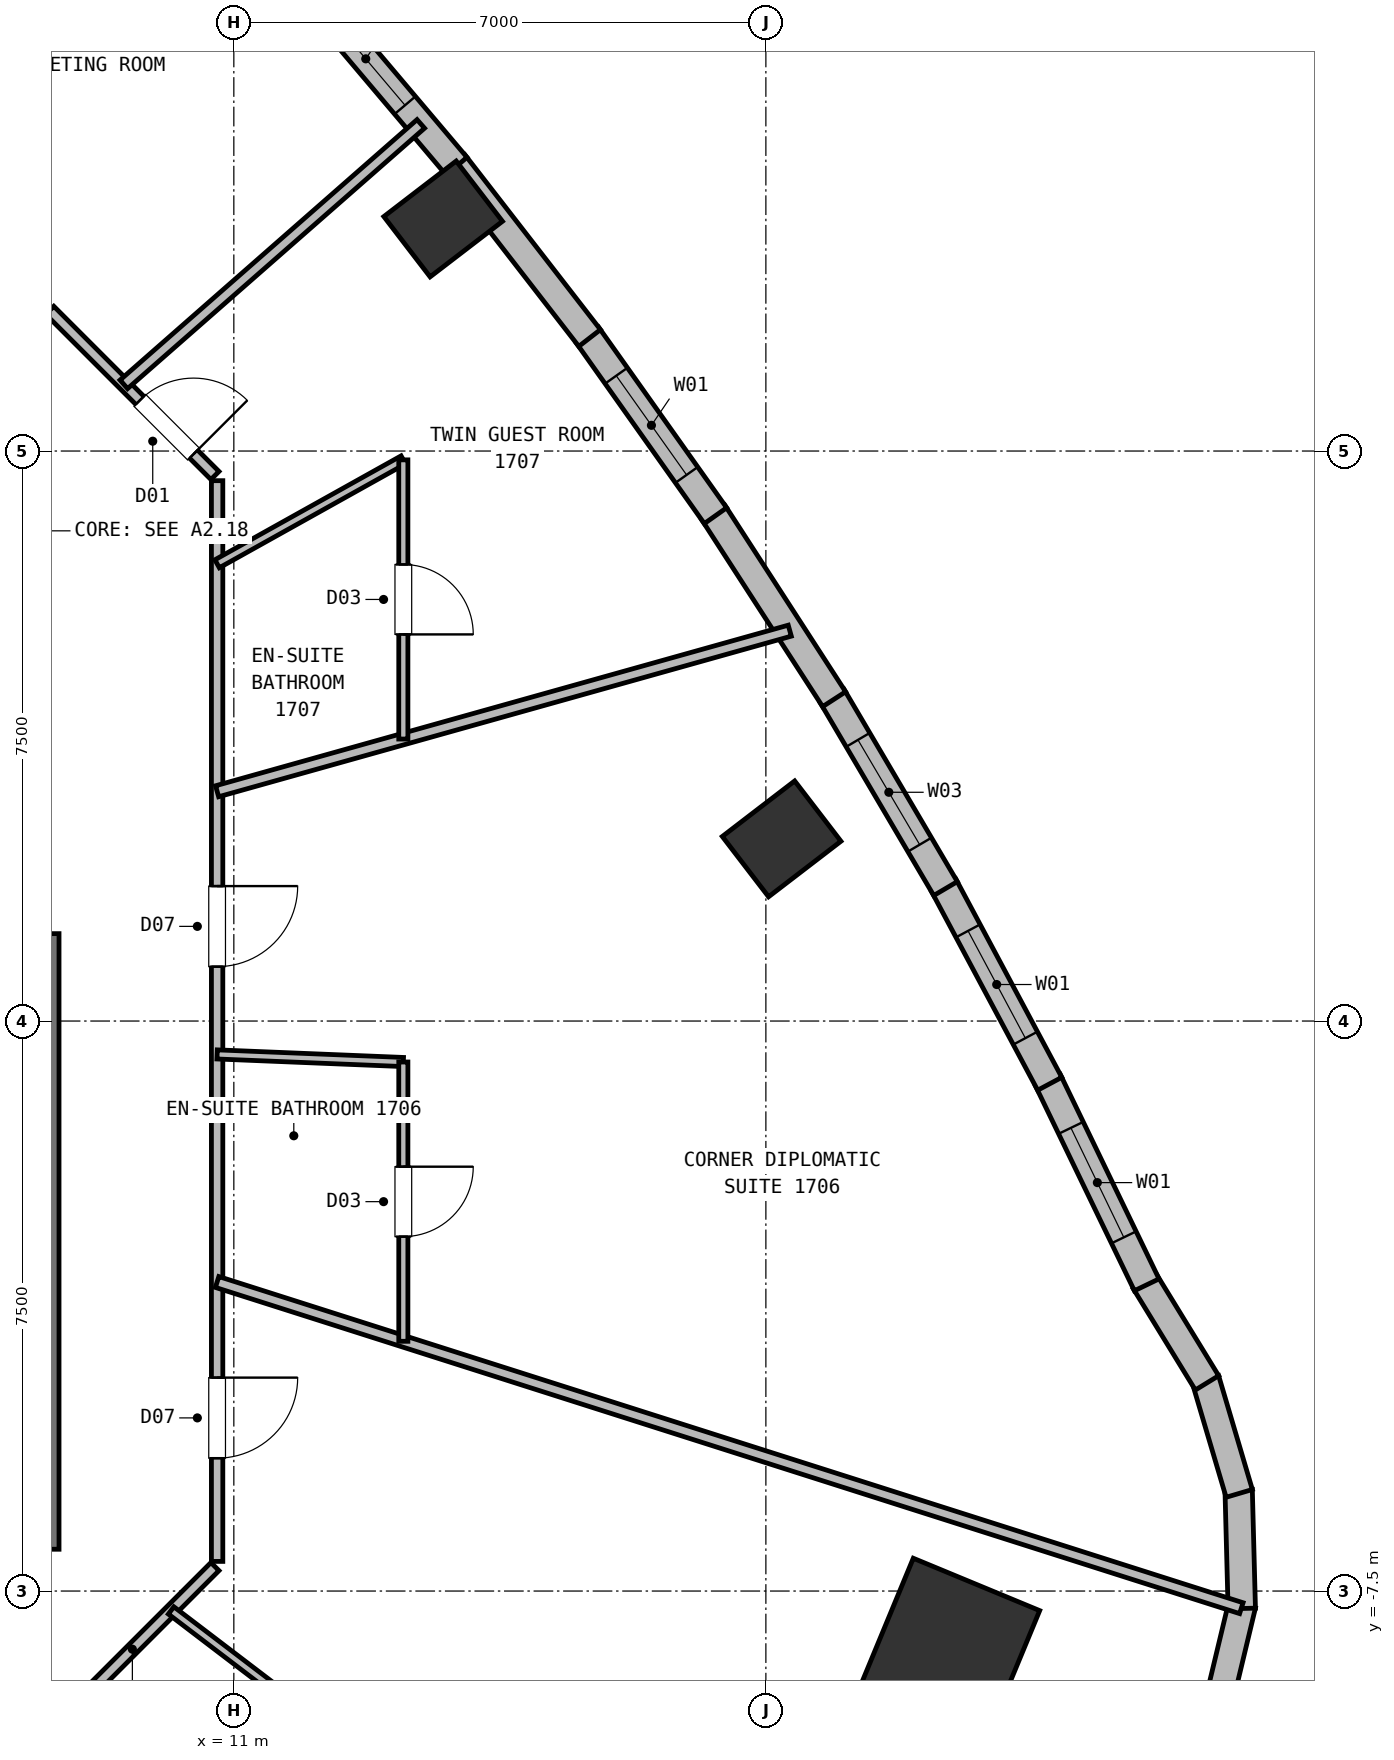
"""IFC4 building model, lengths in metres.
Left out: names, types, materials, properties, quantities, classifications, styles, units other than length and angle.
Written with IfcOpenShell. Run it as: python <this file> out.ifc"""

import sys

from ifc_helpers import new_model, si_unit, direction, frame, frame_2d, origin, origin_2d, place, context, subcontext, project, spatial, rectangle, extrude, element, fill, save


model = new_model("IFC4")
c1 = context("Model", 3, precision=1e-05, world=origin(), true_north=direction((0.0, 1.0)))
c2 = subcontext(c1, "Body", "Model", "MODEL_VIEW")
j1 = project(units=[si_unit("LENGTHUNIT", "METRE"), si_unit("PLANEANGLEUNIT", "RADIAN")], contexts=[c1])
p1 = place(None, origin())
s1 = spatial("IfcSite", under=j1, at=p1, CompositionType="ELEMENT")
p2 = place(p1, origin())
s2 = spatial("IfcBuilding", under=s1, at=p2, CompositionType="ELEMENT")
p3 = place(p2, frame((0.0, 0.0, 60.5)))
s3 = spatial("IfcBuildingStorey", under=s2, at=p3, CompositionType="ELEMENT", Elevation=60.5)
p4 = place(p3, frame((8.35, -6.95, 0.0), z_axis=(0.0, 0.0, 1.0), x_axis=(0.0, 1.0, 0.0)))
e1 = element("IfcWall", 1, at=p4, inside=s3, PredefinedType="SHEAR", context=c2, shape_type="SweptSolid", body=[
    extrude(rectangle(XDim=8.1, YDim=0.7, at=frame_2d((4.05, 0.0))), origin(), (0.0, 0.0, 1.0), 3.5),
])
p5 = place(p3, frame((20.35, -8.429, 0.0), z_axis=(0.0, 0.0, 1.0), x_axis=(-0.923879532511, 0.382683432365, 0.0)))
e2 = element("IfcColumn", 2, at=p5, inside=s3, PredefinedType="COLUMN", context=c2, shape_type="SweptSolid", body=[
    extrude(rectangle(XDim=1.8, YDim=2.2, at=origin_2d()), origin(), (0.0, 0.0, 1.0), 3.75),
])
for number, where, z_axis, x_axis in (
    (3, (18.207, 2.397, 0.0), (0.0, 0.0, 1.0), (-0.609, 0.793, 0.0)),
    (4, (13.754, 10.554, 0.0), (0.0, 0.0, 1.0), (-0.609, 0.793, 0.0)),
):
    element("IfcColumn", number, at=place(p3, frame(where, z_axis=z_axis, x_axis=x_axis)), inside=s3, PredefinedType="COLUMN", context=c2, shape_type="SweptSolid", body=[
        extrude(rectangle(XDim=1.0, YDim=1.2, at=origin_2d()), origin(), (0.0, 0.0, 1.0), 3.75),
    ])
p6 = place(p3, frame((24.266, -7.68, 0.0), z_axis=(0.0, 0.0, 1.0), x_axis=(-0.233491011935, -0.97235896013, 0.0)))
e5 = element("IfcWall", 5, at=p6, inside=s3, PredefinedType="SOLIDWALL", context=c2, shape_type="SweptSolid", body=[
    extrude(rectangle(XDim=1.564, YDim=0.36, at=frame_2d((0.782, 0.0))), origin(), (0.0, 0.0, 1.0), 3.5),
])
p7 = place(p3, frame((24.22, -6.166, 0.0), z_axis=(0.0, 0.0, 1.0), x_axis=(0.026224581645, -0.999656076517, 0.0)))
e6 = element("IfcWall", 6, at=p7, inside=s3, PredefinedType="SOLIDWALL", context=c2, shape_type="SweptSolid", body=[
    extrude(rectangle(XDim=1.564, YDim=0.36, at=frame_2d((0.782, 0.0))), origin(), (0.0, 0.0, 1.0), 3.5),
])
for number, where, z_axis, x_axis in (
    (7, (23.784, -4.715, 0.0), (0.0, 0.0, 1.0), (0.284, -0.959, 0.0)),
    (8, (22.987, -3.427, 0.0), (0.0, 0.0, 1.0), (0.523, -0.853, 0.0)),
):
    element("IfcWall", number, at=place(p3, frame(where, z_axis=z_axis, x_axis=x_axis)), inside=s3, PredefinedType="SOLIDWALL", context=c2, shape_type="SweptSolid", body=[
        extrude(rectangle(XDim=1.564, YDim=0.36, at=frame_2d((0.782, 0.0))), origin(), (0.0, 0.0, 1.0), 3.5),
    ])
p8 = place(p3, frame((21.712, -0.781, 0.0), z_axis=(0.0, 0.0, 1.0), x_axis=(0.434746780096, -0.900552739819, 0.0)))
e9 = element("IfcWall", 9, at=p8, inside=s3, PredefinedType="SOLIDWALL", context=c2, shape_type="SweptSolid", body=[
    extrude(rectangle(XDim=2.987, YDim=0.36, at=frame_2d((1.494, 0.0))), origin(), (0.0, 0.0, 1.0), 3.5),
])
p9 = place(p8, frame((0.694, 0.0, 0.72)))
e10 = element("IfcOpeningElement", 10, at=p9, cuts=e9, PredefinedType="OPENING", context=c2, shape_type="SweptSolid", body=[
    extrude(rectangle(XDim=1.6, YDim=1.88, at=frame_2d((0.8, 0.94))), frame((0.0, 0.19, 0.0), z_axis=(0.0, -1.0, 0.0), x_axis=(1.0, 0.0, 0.0)), (0.0, 0.0, 1.0), 0.38),
])
p10 = place(p3, frame((20.339, 1.787, 0.0), z_axis=(0.0, 0.0, 1.0), x_axis=(0.471187121095, -0.882033274267, 0.0)))
e11 = element("IfcWall", 11, at=p10, inside=s3, PredefinedType="SOLIDWALL", context=c2, shape_type="SweptSolid", body=[
    extrude(rectangle(XDim=2.962, YDim=0.36, at=frame_2d((1.481, 0.0))), origin(), (0.0, 0.0, 1.0), 3.5),
])
p11 = place(p10, frame((0.681, 0.0, 0.72)))
e12 = element("IfcOpeningElement", 12, at=p11, cuts=e11, PredefinedType="OPENING", context=c2, shape_type="SweptSolid", body=[
    extrude(rectangle(XDim=1.6, YDim=1.88, at=frame_2d((0.8, 0.94))), frame((0.0, 0.19, 0.0), z_axis=(0.0, -1.0, 0.0), x_axis=(1.0, 0.0, 0.0)), (0.0, 0.0, 1.0), 0.38),
])
p12 = place(p3, frame((18.872, 4.277, 0.0), z_axis=(0.0, 0.0, 1.0), x_axis=(0.507397387312, -0.861712185912, 0.0)))
e13 = element("IfcWall", 13, at=p12, inside=s3, PredefinedType="SOLIDWALL", context=c2, shape_type="SweptSolid", body=[
    extrude(rectangle(XDim=2.941, YDim=0.36, at=frame_2d((1.47, 0.0))), origin(), (0.0, 0.0, 1.0), 3.5),
])
p13 = place(p12, frame((0.67, 0.0, 0.72)))
e14 = element("IfcOpeningElement", 14, at=p13, cuts=e13, PredefinedType="OPENING", context=c2, shape_type="SweptSolid", body=[
    extrude(rectangle(XDim=1.6, YDim=1.88, at=frame_2d((0.8, 0.94))), frame((0.0, 0.19, 0.0), z_axis=(0.0, -1.0, 0.0), x_axis=(1.0, 0.0, 0.0)), (0.0, 0.0, 1.0), 0.38),
])
p14 = place(p3, frame((17.309, 6.691, 0.0), z_axis=(0.0, 0.0, 1.0), x_axis=(0.543168221009, -0.839623894185, 0.0)))
e15 = element("IfcWall", 15, at=p14, inside=s3, PredefinedType="SOLIDWALL", context=c2, shape_type="SweptSolid", body=[
    extrude(rectangle(XDim=2.925, YDim=0.36, at=frame_2d((1.463, 0.0))), origin(), (0.0, 0.0, 1.0), 3.5),
])
p15 = place(p3, frame((15.651, 9.027, 0.0), z_axis=(0.0, 0.0, 1.0), x_axis=(0.578342640262, -0.815793963237, 0.0)))
e16 = element("IfcWall", 16, at=p15, inside=s3, PredefinedType="SOLIDWALL", context=c2, shape_type="SweptSolid", body=[
    extrude(rectangle(XDim=2.915, YDim=0.36, at=frame_2d((1.458, 0.0))), origin(), (0.0, 0.0, 1.0), 3.5),
])
p16 = place(p15, frame((0.657, 0.0, 0.72)))
e17 = element("IfcOpeningElement", 17, at=p16, cuts=e16, PredefinedType="OPENING", context=c2, shape_type="SweptSolid", body=[
    extrude(rectangle(XDim=1.6, YDim=1.88, at=frame_2d((0.8, 0.94))), frame((0.0, 0.19, 0.0), z_axis=(0.0, -1.0, 0.0), x_axis=(1.0, 0.0, 0.0)), (0.0, 0.0, 1.0), 0.38),
])
p17 = place(p3, frame((13.899, 11.287, 0.0), z_axis=(0.0, 0.0, 1.0), x_axis=(0.612545453358, -0.79043536584, 0.0)))
e18 = element("IfcWall", 18, at=p17, inside=s3, PredefinedType="SOLIDWALL", context=c2, shape_type="SweptSolid", body=[
    extrude(rectangle(XDim=2.909, YDim=0.36, at=frame_2d((1.455, 0.0))), origin(), (0.0, 0.0, 1.0), 3.5),
])
p18 = place(p3, frame((12.051, 13.47, 0.0), z_axis=(0.0, 0.0, 1.0), x_axis=(0.645836916795, -0.763475393779, 0.0)))
e19 = element("IfcWall", 19, at=p18, inside=s3, PredefinedType="SOLIDWALL", context=c2, shape_type="SweptSolid", body=[
    extrude(rectangle(XDim=2.91, YDim=0.36, at=frame_2d((1.455, 0.0))), origin(), (0.0, 0.0, 1.0), 3.5),
])
p19 = place(p18, frame((0.26, 0.0, 0.72)))
e20 = element("IfcOpeningElement", 20, at=p19, cuts=e19, PredefinedType="OPENING", context=c2, shape_type="SweptSolid", body=[
    extrude(rectangle(XDim=1.6, YDim=1.88, at=frame_2d((0.8, 0.94))), frame((0.0, 0.19, 0.0), z_axis=(0.0, -1.0, 0.0), x_axis=(1.0, 0.0, 0.0)), (0.0, 0.0, 1.0), 0.38),
])
p20 = place(p3, frame((10.752, -7.178, 0.0), z_axis=(0.0, 0.0, 1.0), x_axis=(-0.707067066127, -0.707146494016, 0.0)))
e21 = element("IfcWall", 21, at=p20, inside=s3, PredefinedType="PARTITIONING", context=c2, shape_type="SweptSolid", body=[
    extrude(rectangle(XDim=3.074, YDim=0.15, at=frame_2d((1.537, 0.0))), origin(), (0.0, 0.0, 1.0), 3.12),
])
p21 = place(p3, frame((10.78, 7.11, 0.0), z_axis=(0.0, 0.0, 1.0), x_axis=(0.0, -1.0, 0.0)))
e22 = element("IfcWall", 22, at=p21, inside=s3, PredefinedType="PARTITIONING", context=c2, shape_type="SweptSolid", body=[
    extrude(rectangle(XDim=14.22, YDim=0.15, at=frame_2d((7.11, 0.0))), origin(), (0.0, 0.0, 1.0), 3.12),
])
p22 = place(p21, frame((5.334, 0.0, 0.0)))
e23 = element("IfcOpeningElement", 23, at=p22, cuts=e22, PredefinedType="OPENING", context=c2, shape_type="SweptSolid", body=[
    extrude(rectangle(XDim=1.06, YDim=2.15, at=frame_2d((0.53, 1.075))), frame((0.0, 0.085, 0.0), z_axis=(0.0, -1.0, 0.0), x_axis=(1.0, 0.0, 0.0)), (0.0, 0.0, 1.0), 0.17),
])
p23 = place(p21, frame((11.802, 0.0, 0.0)))
e24 = element("IfcOpeningElement", 24, at=p23, cuts=e22, PredefinedType="OPENING", context=c2, shape_type="SweptSolid", body=[
    extrude(rectangle(XDim=1.06, YDim=2.15, at=frame_2d((0.53, 1.075))), frame((0.0, 0.085, 0.0), z_axis=(0.0, -1.0, 0.0), x_axis=(1.0, 0.0, 0.0)), (0.0, 0.0, 1.0), 0.17),
])
p24 = place(p3, frame((8.578, 9.352, 0.0), z_axis=(0.0, 0.0, 1.0), x_axis=(0.707067066127, -0.707146494016, 0.0)))
e25 = element("IfcWall", 25, at=p24, inside=s3, PredefinedType="PARTITIONING", context=c2, shape_type="SweptSolid", body=[
    extrude(rectangle(XDim=3.074, YDim=0.15, at=frame_2d((1.537, 0.0))), origin(), (0.0, 0.0, 1.0), 3.5),
])
p25 = place(p24, frame((1.676, 0.0, 0.0)))
e26 = element("IfcOpeningElement", 26, at=p25, cuts=e25, PredefinedType="OPENING", context=c2, shape_type="SweptSolid", body=[
    extrude(rectangle(XDim=1.0, YDim=2.15, at=frame_2d((0.5, 1.075))), frame((0.0, 0.085, 0.0), z_axis=(0.0, -1.0, 0.0), x_axis=(1.0, 0.0, 0.0)), (0.0, 0.0, 1.0), 0.17),
])
p26 = place(p3, frame((10.175, -7.755, 0.0), z_axis=(0.0, 0.0, 1.0), x_axis=(0.795354638284, -0.606144371714, 0.0)))
e27 = element("IfcWall", 27, at=p26, inside=s3, PredefinedType="PARTITIONING", context=c2, shape_type="SweptSolid", body=[
    extrude(rectangle(XDim=2.472, YDim=0.12, at=frame_2d((1.236, 0.0))), origin(), (0.0, 0.0, 1.0), 3.5),
])
p27 = place(p3, frame((10.78, -3.433, 0.0), z_axis=(0.0, 0.0, 1.0), x_axis=(0.952837774097, -0.303480108497, 0.0)))
e28 = element("IfcWall", 28, at=p27, inside=s3, PredefinedType="PARTITIONING", context=c2, shape_type="SweptSolid", body=[
    extrude(rectangle(XDim=14.143, YDim=0.15, at=frame_2d((7.071, 0.0))), origin(), (0.0, 0.0, 1.0), 3.5),
])
p28 = place(p3, frame((13.23, -0.539, 0.0), z_axis=(0.0, 0.0, 1.0), x_axis=(-0.999170452606, 0.040723539125, 0.0)))
e29 = element("IfcWall", 29, at=p28, inside=s3, PredefinedType="PARTITIONING", context=c2, shape_type="SweptSolid", body=[
    extrude(rectangle(XDim=2.452, YDim=0.12, at=frame_2d((1.226, 0.0))), origin(), (0.0, 0.0, 1.0), 3.5),
])
p29 = place(p3, frame((13.23, -0.539, 0.0), z_axis=(0.0, 0.0, 1.0), x_axis=(0.0, -1.0, 0.0)))
e30 = element("IfcWall", 30, at=p29, inside=s3, PredefinedType="PARTITIONING", context=c2, shape_type="SweptSolid", body=[
    extrude(rectangle(XDim=3.675, YDim=0.12, at=frame_2d((1.837, 0.0))), origin(), (0.0, 0.0, 1.0), 3.12),
])
p30 = place(p29, frame((1.377, 0.0, 0.0)))
e31 = element("IfcOpeningElement", 31, at=p30, cuts=e30, PredefinedType="OPENING", context=c2, shape_type="SweptSolid", body=[
    extrude(rectangle(XDim=0.92, YDim=2.1, at=frame_2d((0.46, 1.05))), frame((0.0, 0.07, 0.0), z_axis=(0.0, -1.0, 0.0), x_axis=(1.0, 0.0, 0.0)), (0.0, 0.0, 1.0), 0.14),
])
p31 = place(p3, frame((10.78, 3.023, 0.0), z_axis=(0.0, 0.0, 1.0), x_axis=(0.962851172518, 0.27003262688, 0.0)))
e32 = element("IfcWall", 32, at=p31, inside=s3, PredefinedType="PARTITIONING", context=c2, shape_type="SweptSolid", body=[
    extrude(rectangle(XDim=7.825, YDim=0.15, at=frame_2d((3.913, 0.0))), origin(), (0.0, 0.0, 1.0), 3.5),
])
p32 = place(p3, frame((13.23, 7.384, 0.0), z_axis=(0.0, 0.0, 1.0), x_axis=(-0.873232148454, -0.487304437602, 0.0)))
e33 = element("IfcWall", 33, at=p32, inside=s3, PredefinedType="PARTITIONING", context=c2, shape_type="SweptSolid", body=[
    extrude(rectangle(XDim=2.806, YDim=0.12, at=frame_2d((1.403, 0.0))), origin(), (0.0, 0.0, 1.0), 3.5),
])
p33 = place(p3, frame((13.23, 7.384, 0.0), z_axis=(0.0, 0.0, 1.0), x_axis=(0.0, -1.0, 0.0)))
e34 = element("IfcWall", 34, at=p33, inside=s3, PredefinedType="PARTITIONING", context=c2, shape_type="SweptSolid", body=[
    extrude(rectangle(XDim=3.673, YDim=0.12, at=frame_2d((1.837, 0.0))), origin(), (0.0, 0.0, 1.0), 3.5),
])
p34 = place(p33, frame((1.377, 0.0, 0.0)))
e35 = element("IfcOpeningElement", 35, at=p34, cuts=e34, PredefinedType="OPENING", context=c2, shape_type="SweptSolid", body=[
    extrude(rectangle(XDim=0.92, YDim=2.1, at=frame_2d((0.46, 1.05))), frame((0.0, 0.07, 0.0), z_axis=(0.0, -1.0, 0.0), x_axis=(1.0, 0.0, 0.0)), (0.0, 0.0, 1.0), 0.14),
])
p35 = place(p3, frame((9.552, 8.377, 0.0), z_axis=(0.0, 0.0, 1.0), x_axis=(0.75184000053, 0.659345594967, 0.0)))
e36 = element("IfcWall", 36, at=p35, inside=s3, PredefinedType="PARTITIONING", context=c2, shape_type="SweptSolid", body=[
    extrude(rectangle(XDim=5.197, YDim=0.15, at=frame_2d((2.599, 0.0))), origin(), (0.0, 0.0, 1.0), 3.5),
])
p36 = place(p9, origin())
e37 = element("IfcWindow", 37, at=p36, inside=s3, PartitioningType="SINGLE_PANEL", PredefinedType="WINDOW", context=c2, shape_type="SweptSolid", body=[
    extrude(rectangle(XDim=1.6, YDim=1.88, at=frame_2d((0.8, 0.94))), frame((0.0, 0.03, 0.0), z_axis=(0.0, -1.0, 0.0), x_axis=(1.0, 0.0, 0.0)), (0.0, 0.0, 1.0), 0.06),
])
fill(e10, e37)
p37 = place(p11, origin())
e38 = element("IfcWindow", 38, at=p37, inside=s3, PartitioningType="SINGLE_PANEL", PredefinedType="WINDOW", context=c2, shape_type="SweptSolid", body=[
    extrude(rectangle(XDim=1.6, YDim=1.88, at=frame_2d((0.8, 0.94))), frame((0.0, 0.03, 0.0), z_axis=(0.0, -1.0, 0.0), x_axis=(1.0, 0.0, 0.0)), (0.0, 0.0, 1.0), 0.06),
])
fill(e12, e38)
p38 = place(p13, origin())
e39 = element("IfcWindow", 39, at=p38, inside=s3, PartitioningType="SINGLE_PANEL", PredefinedType="WINDOW", context=c2, shape_type="SweptSolid", body=[
    extrude(rectangle(XDim=1.6, YDim=1.88, at=frame_2d((0.8, 0.94))), frame((0.0, 0.03, 0.0), z_axis=(0.0, -1.0, 0.0), x_axis=(1.0, 0.0, 0.0)), (0.0, 0.0, 1.0), 0.06),
])
fill(e14, e39)
p39 = place(p16, origin())
e40 = element("IfcWindow", 40, at=p39, inside=s3, PartitioningType="SINGLE_PANEL", PredefinedType="WINDOW", context=c2, shape_type="SweptSolid", body=[
    extrude(rectangle(XDim=1.6, YDim=1.88, at=frame_2d((0.8, 0.94))), frame((0.0, 0.03, 0.0), z_axis=(0.0, -1.0, 0.0), x_axis=(1.0, 0.0, 0.0)), (0.0, 0.0, 1.0), 0.06),
])
fill(e17, e40)
p40 = place(p19, origin())
e41 = element("IfcWindow", 41, at=p40, inside=s3, PartitioningType="SINGLE_PANEL", PredefinedType="WINDOW", context=c2, shape_type="SweptSolid", body=[
    extrude(rectangle(XDim=1.6, YDim=1.88, at=frame_2d((0.8, 0.94))), frame((0.0, 0.03, 0.0), z_axis=(0.0, -1.0, 0.0), x_axis=(1.0, 0.0, 0.0)), (0.0, 0.0, 1.0), 0.06),
])
fill(e20, e41)
p41 = place(p30, origin())
e42 = element("IfcDoor", 42, at=p41, inside=s3, OperationType="SINGLE_SWING_LEFT", PredefinedType="DOOR", context=c2, shape_type="SweptSolid", body=[
    extrude(rectangle(XDim=0.92, YDim=2.1, at=frame_2d((0.46, 1.05))), frame((0.0, 0.025, 0.0), z_axis=(0.0, -1.0, 0.0), x_axis=(1.0, 0.0, 0.0)), (0.0, 0.0, 1.0), 0.05),
])
fill(e31, e42)
p42 = place(p34, origin())
e43 = element("IfcDoor", 43, at=p42, inside=s3, OperationType="SINGLE_SWING_RIGHT", PredefinedType="DOOR", context=c2, shape_type="SweptSolid", body=[
    extrude(rectangle(XDim=0.92, YDim=2.1, at=frame_2d((0.46, 1.05))), frame((0.0, 0.025, 0.0), z_axis=(0.0, -1.0, 0.0), x_axis=(1.0, 0.0, 0.0)), (0.0, 0.0, 1.0), 0.05),
])
fill(e35, e43)
p43 = place(p25, origin())
e44 = element("IfcDoor", 44, at=p43, inside=s3, OperationType="SINGLE_SWING_RIGHT", PredefinedType="DOOR", context=c2, shape_type="SweptSolid", body=[
    extrude(rectangle(XDim=1.0, YDim=2.15, at=frame_2d((0.5, 1.075))), frame((0.0, 0.025, 0.0), z_axis=(0.0, -1.0, 0.0), x_axis=(1.0, 0.0, 0.0)), (0.0, 0.0, 1.0), 0.05),
])
fill(e26, e44)
p44 = place(p22, origin())
e45 = element("IfcDoor", 45, at=p44, inside=s3, OperationType="SINGLE_SWING_LEFT", PredefinedType="DOOR", context=c2, shape_type="SweptSolid", body=[
    extrude(rectangle(XDim=1.06, YDim=2.15, at=frame_2d((0.53, 1.075))), frame((0.0, 0.025, 0.0), z_axis=(0.0, -1.0, 0.0), x_axis=(1.0, 0.0, 0.0)), (0.0, 0.0, 1.0), 0.05),
])
fill(e23, e45)
p45 = place(p23, origin())
e46 = element("IfcDoor", 46, at=p45, inside=s3, OperationType="SINGLE_SWING_LEFT", PredefinedType="DOOR", context=c2, shape_type="SweptSolid", body=[
    extrude(rectangle(XDim=1.06, YDim=2.15, at=frame_2d((0.53, 1.075))), frame((0.0, 0.025, 0.0), z_axis=(0.0, -1.0, 0.0), x_axis=(1.0, 0.0, 0.0)), (0.0, 0.0, 1.0), 0.05),
])
fill(e24, e46)
save(model, sys.argv[1])
